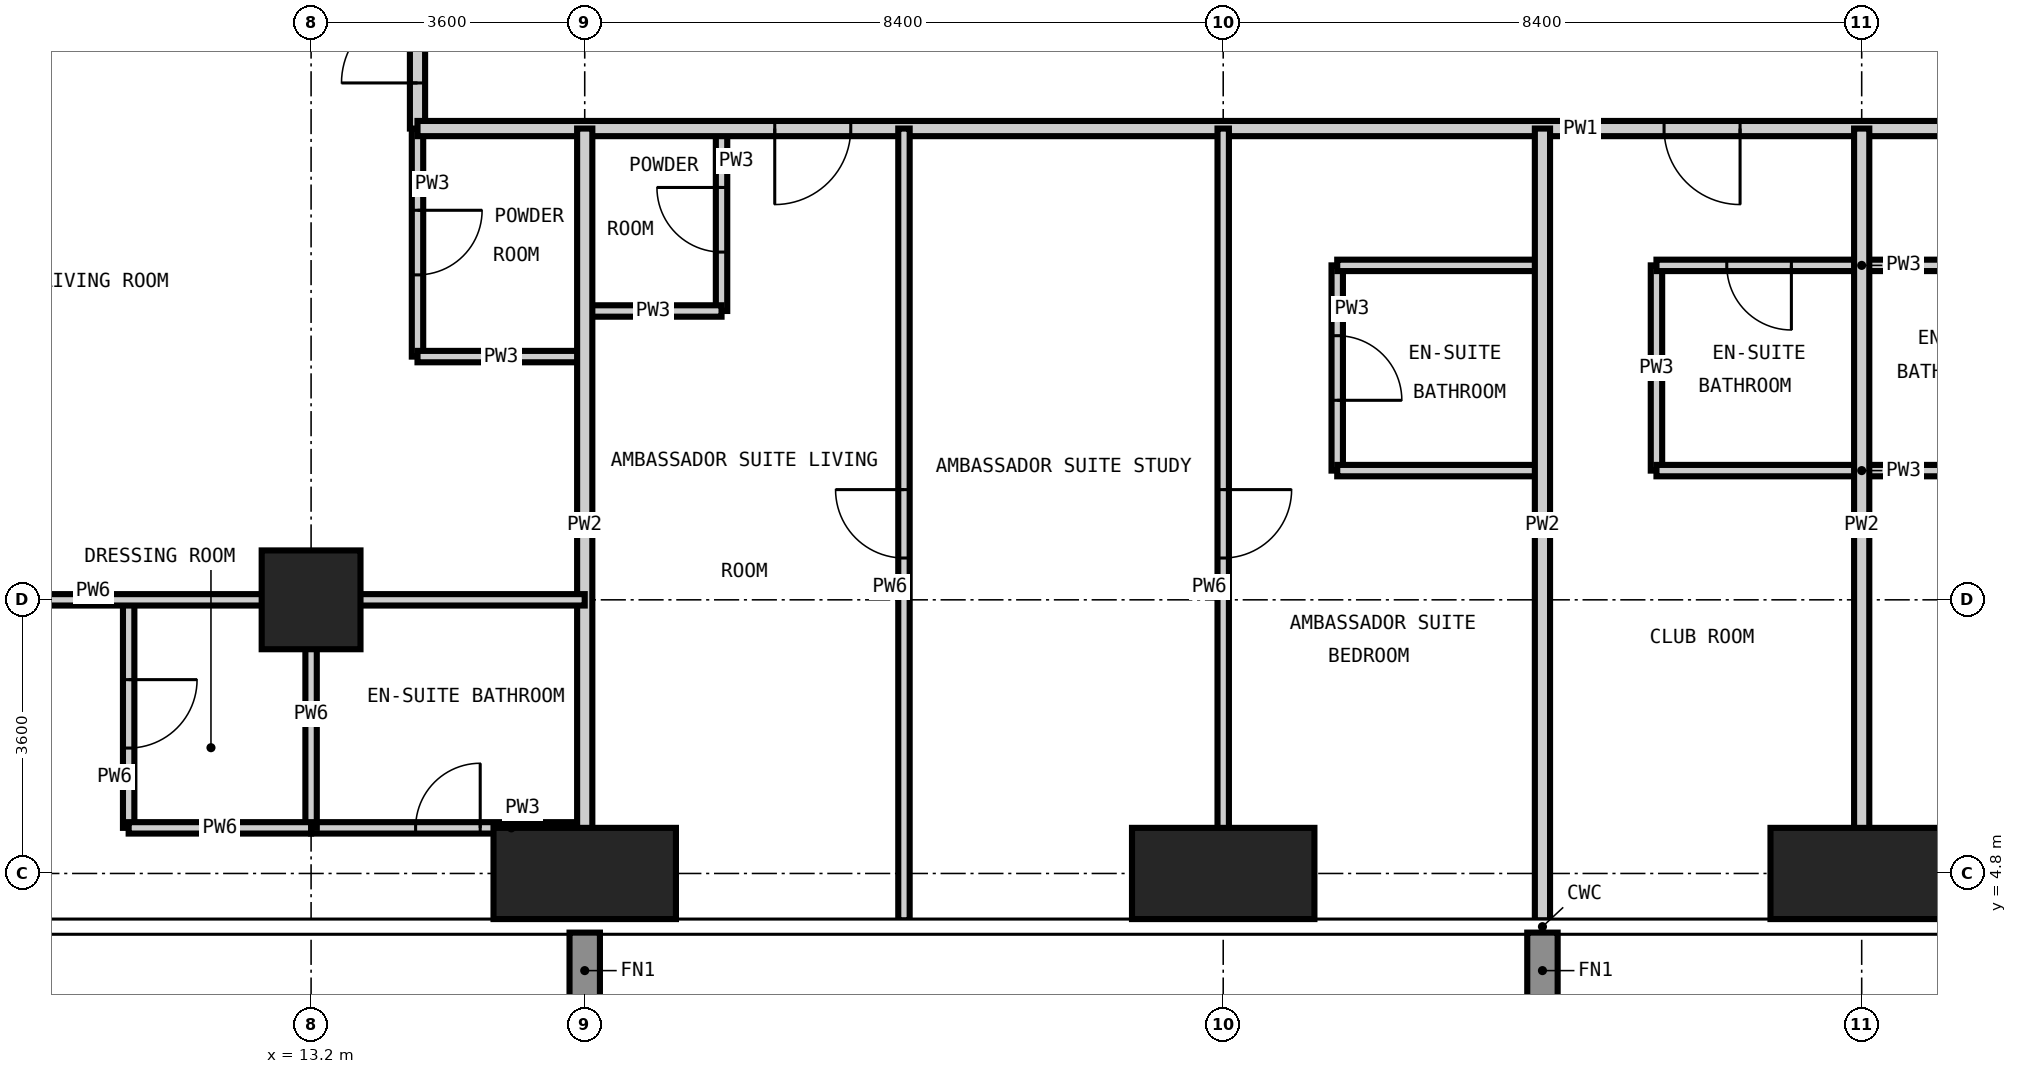
"""IFC4 building model, lengths in metres.
Left out: names, types, materials, properties, quantities, classifications, styles, units other than length and angle.
Written with IfcOpenShell. Run it as: python <this file> out.ifc"""

import sys

from ifc_helpers import new_model, si_unit, direction, frame, frame_2d, origin, origin_2d, place, context, subcontext, project, spatial, rectangle, extrude, element, fill, save


model = new_model("IFC4")
c1 = context("Model", 3, precision=1e-05, world=origin(), true_north=direction((0.0, 1.0)))
c2 = subcontext(c1, "Body", "Model", "MODEL_VIEW")
j1 = project(units=[si_unit("LENGTHUNIT", "METRE"), si_unit("PLANEANGLEUNIT", "RADIAN")], contexts=[c1])
p1 = place(None, origin())
s1 = spatial("IfcSite", under=j1, at=p1, CompositionType="ELEMENT")
p2 = place(p1, origin())
s2 = spatial("IfcBuilding", under=s1, at=p2, CompositionType="ELEMENT")
p3 = place(p2, frame((0.0, 0.0, 205.8)))
s3 = spatial("IfcBuildingStorey", under=s2, at=p3, CompositionType="ELEMENT", Elevation=205.8)
p4 = place(p3, frame((13.2, 8.4, -0.35), z_axis=(0.0, 0.0, 1.0), x_axis=(1.0, 0.0, 0.0)))
e1 = element("IfcColumn", 1, at=p4, inside=s3, PredefinedType="COLUMN", context=c2, shape_type="SweptSolid", body=[
    extrude(rectangle(XDim=1.3, YDim=1.3, at=origin_2d()), origin(), (0.0, 0.0, 1.0), 3.6),
])
for number, where, z_axis, x_axis in (
    (2, (16.8, 4.8, -0.35), (0.0, 0.0, 1.0), (1.0, 0.0, 0.0)),
    (3, (25.2, 4.8, -0.35), (0.0, 0.0, 1.0), (1.0, 0.0, 0.0)),
    (4, (33.6, 4.8, -0.35), (0.0, 0.0, 1.0), (1.0, 0.0, 0.0)),
):
    element("IfcColumn", number, at=place(p3, frame(where, z_axis=z_axis, x_axis=x_axis)), inside=s3, PredefinedType="COLUMN", context=c2, shape_type="SweptSolid", body=[
        extrude(rectangle(XDim=2.4, YDim=1.2, at=origin_2d()), origin(), (0.0, 0.0, 1.0), 3.6),
    ])
p5 = place(p3, frame((14.6, 11.6, 0.0), z_axis=(0.0, 0.0, 1.0), x_axis=(0.0, 1.0, 0.0)))
e5 = element("IfcWall", 5, at=p5, inside=s3, PredefinedType="PARTITIONING", context=c2, shape_type="SweptSolid", body=[
    extrude(rectangle(XDim=3.0, YDim=0.15, at=frame_2d((1.5, 0.0))), origin(), (0.0, 0.0, 1.0), 3.25),
])
p6 = place(p5, frame((1.075, 0.0, 0.0)))
e6 = element("IfcOpeningElement", 6, at=p6, cuts=e5, PredefinedType="OPENING", context=c2, shape_type="SweptSolid", body=[
    extrude(rectangle(XDim=0.85, YDim=2.1, at=frame_2d((0.425, 1.05))), frame((0.0, 0.085, 0.0), z_axis=(0.0, -1.0, 0.0), x_axis=(1.0, 0.0, 0.0)), (0.0, 0.0, 1.0), 0.17),
])
p7 = place(p3, frame((18.6, 12.2, 0.0), z_axis=(0.0, 0.0, 1.0), x_axis=(0.0, 1.0, 0.0)))
e7 = element("IfcWall", 7, at=p7, inside=s3, PredefinedType="PARTITIONING", context=c2, shape_type="SweptSolid", body=[
    extrude(rectangle(XDim=2.4, YDim=0.15, at=frame_2d((1.2, 0.0))), origin(), (0.0, 0.0, 1.0), 3.25),
])
p8 = place(p7, frame((0.775, 0.0, 0.0)))
e8 = element("IfcOpeningElement", 8, at=p8, cuts=e7, PredefinedType="OPENING", context=c2, shape_type="SweptSolid", body=[
    extrude(rectangle(XDim=0.85, YDim=2.1, at=frame_2d((0.425, 1.05))), frame((0.0, 0.085, 0.0), z_axis=(0.0, -1.0, 0.0), x_axis=(1.0, 0.0, 0.0)), (0.0, 0.0, 1.0), 0.17),
])
p9 = place(p3, frame((26.7, 10.1, 0.0), z_axis=(0.0, 0.0, 1.0), x_axis=(0.0, 1.0, 0.0)))
e9 = element("IfcWall", 9, at=p9, inside=s3, PredefinedType="PARTITIONING", context=c2, shape_type="SweptSolid", body=[
    extrude(rectangle(XDim=2.7, YDim=0.15, at=frame_2d((1.35, 0.0))), origin(), (0.0, 0.0, 1.0), 3.25),
])
p10 = place(p9, frame((0.925, 0.0, 0.0)))
e10 = element("IfcOpeningElement", 10, at=p10, cuts=e9, PredefinedType="OPENING", context=c2, shape_type="SweptSolid", body=[
    extrude(rectangle(XDim=0.85, YDim=2.1, at=frame_2d((0.425, 1.05))), frame((0.0, 0.085, 0.0), z_axis=(0.0, -1.0, 0.0), x_axis=(1.0, 0.0, 0.0)), (0.0, 0.0, 1.0), 0.17),
])
p11 = place(p3, frame((30.9, 10.1, 0.0), z_axis=(0.0, 0.0, 1.0), x_axis=(0.0, 1.0, 0.0)))
e11 = element("IfcWall", 11, at=p11, inside=s3, PredefinedType="PARTITIONING", context=c2, shape_type="SweptSolid", body=[
    extrude(rectangle(XDim=2.7, YDim=0.15, at=frame_2d((1.35, 0.0))), origin(), (0.0, 0.0, 1.0), 3.25),
])
p12 = place(p3, frame((13.2, 5.4, 0.0), z_axis=(0.0, 0.0, 1.0), x_axis=(1.0, 0.0, 0.0)))
e12 = element("IfcWall", 12, at=p12, inside=s3, PredefinedType="PARTITIONING", context=c2, shape_type="SweptSolid", body=[
    extrude(rectangle(XDim=3.6, YDim=0.15, at=frame_2d((1.8, 0.0))), origin(), (0.0, 0.0, 1.0), 3.25),
])
p13 = place(p12, frame((1.375, 0.0, 0.0)))
e13 = element("IfcOpeningElement", 13, at=p13, cuts=e12, PredefinedType="OPENING", context=c2, shape_type="SweptSolid", body=[
    extrude(rectangle(XDim=0.85, YDim=2.1, at=frame_2d((0.425, 1.05))), frame((0.0, 0.085, 0.0), z_axis=(0.0, -1.0, 0.0), x_axis=(1.0, 0.0, 0.0)), (0.0, 0.0, 1.0), 0.17),
])
p14 = place(p3, frame((26.7, 10.1, 0.0), z_axis=(0.0, 0.0, 1.0), x_axis=(1.0, 0.0, 0.0)))
e14 = element("IfcWall", 14, at=p14, inside=s3, PredefinedType="PARTITIONING", context=c2, shape_type="SweptSolid", body=[
    extrude(rectangle(XDim=2.7, YDim=0.15, at=frame_2d((1.35, 0.0))), origin(), (0.0, 0.0, 1.0), 3.25),
])
p15 = place(p3, frame((30.9, 10.1, 0.0), z_axis=(0.0, 0.0, 1.0), x_axis=(1.0, 0.0, 0.0)))
e15 = element("IfcWall", 15, at=p15, inside=s3, PredefinedType="PARTITIONING", context=c2, shape_type="SweptSolid", body=[
    extrude(rectangle(XDim=5.4, YDim=0.15, at=frame_2d((2.7, 0.0))), origin(), (0.0, 0.0, 1.0), 3.25),
])
p16 = place(p3, frame((14.6, 11.6, 0.0), z_axis=(0.0, 0.0, 1.0), x_axis=(1.0, 0.0, 0.0)))
e16 = element("IfcWall", 16, at=p16, inside=s3, PredefinedType="PARTITIONING", context=c2, shape_type="SweptSolid", body=[
    extrude(rectangle(XDim=2.2, YDim=0.15, at=frame_2d((1.1, 0.0))), origin(), (0.0, 0.0, 1.0), 3.25),
])
p17 = place(p3, frame((16.8, 12.2, 0.0), z_axis=(0.0, 0.0, 1.0), x_axis=(1.0, 0.0, 0.0)))
e17 = element("IfcWall", 17, at=p17, inside=s3, PredefinedType="PARTITIONING", context=c2, shape_type="SweptSolid", body=[
    extrude(rectangle(XDim=1.8, YDim=0.15, at=frame_2d((0.9, 0.0))), origin(), (0.0, 0.0, 1.0), 3.25),
])
p18 = place(p3, frame((26.7, 12.8, 0.0), z_axis=(0.0, 0.0, 1.0), x_axis=(1.0, 0.0, 0.0)))
e18 = element("IfcWall", 18, at=p18, inside=s3, PredefinedType="PARTITIONING", context=c2, shape_type="SweptSolid", body=[
    extrude(rectangle(XDim=2.7, YDim=0.15, at=frame_2d((1.35, 0.0))), origin(), (0.0, 0.0, 1.0), 3.25),
])
p19 = place(p3, frame((30.9, 12.8, 0.0), z_axis=(0.0, 0.0, 1.0), x_axis=(1.0, 0.0, 0.0)))
e19 = element("IfcWall", 19, at=p19, inside=s3, PredefinedType="PARTITIONING", context=c2, shape_type="SweptSolid", body=[
    extrude(rectangle(XDim=5.4, YDim=0.15, at=frame_2d((2.7, 0.0))), origin(), (0.0, 0.0, 1.0), 3.25),
])
p20 = place(p19, frame((0.925, 0.0, 0.0)))
e20 = element("IfcOpeningElement", 20, at=p20, cuts=e19, PredefinedType="OPENING", context=c2, shape_type="SweptSolid", body=[
    extrude(rectangle(XDim=0.85, YDim=2.1, at=frame_2d((0.425, 1.05))), frame((0.0, 0.085, 0.0), z_axis=(0.0, -1.0, 0.0), x_axis=(1.0, 0.0, 0.0)), (0.0, 0.0, 1.0), 0.17),
])
p21 = place(p3, frame((14.6, 14.6, 0.0), z_axis=(0.0, 0.0, 1.0), x_axis=(0.0, 1.0, 0.0)))
e21 = element("IfcWall", 21, at=p21, inside=s3, PredefinedType="PARTITIONING", context=c2, shape_type="SweptSolid", body=[
    extrude(rectangle(XDim=13.0, YDim=0.2, at=frame_2d((6.5, 0.0))), origin(), (0.0, 0.0, 1.0), 3.25),
])
p22 = place(p21, frame((3.8, 0.0, 0.0)))
e22 = element("IfcOpeningElement", 22, at=p22, cuts=e21, PredefinedType="OPENING", context=c2, shape_type="SweptSolid", body=[
    extrude(rectangle(XDim=1.0, YDim=2.2, at=frame_2d((0.5, 1.1))), frame((0.0, 0.11, 0.0), z_axis=(0.0, -1.0, 0.0), x_axis=(1.0, 0.0, 0.0)), (0.0, 0.0, 1.0), 0.22),
])
p23 = place(p21, frame((8.0, 0.0, 0.0)))
e23 = element("IfcOpeningElement", 23, at=p23, cuts=e21, PredefinedType="OPENING", context=c2, shape_type="SweptSolid", body=[
    extrude(rectangle(XDim=1.0, YDim=2.2, at=frame_2d((0.5, 1.1))), frame((0.0, 0.11, 0.0), z_axis=(0.0, -1.0, 0.0), x_axis=(1.0, 0.0, 0.0)), (0.0, 0.0, 1.0), 0.22),
])
p24 = place(p21, frame((0.6, 0.0, 0.0)))
e24 = element("IfcOpeningElement", 24, at=p24, cuts=e21, PredefinedType="OPENING", context=c2, shape_type="SweptSolid", body=[
    extrude(rectangle(XDim=1.0, YDim=2.2, at=frame_2d((0.5, 1.1))), frame((0.0, 0.11, 0.0), z_axis=(0.0, -1.0, 0.0), x_axis=(1.0, 0.0, 0.0)), (0.0, 0.0, 1.0), 0.22),
])
p25 = place(p3, frame((44.8, 14.6, 0.0), z_axis=(0.0, 0.0, 1.0), x_axis=(-1.0, 0.0, 0.0)))
e25 = element("IfcWall", 25, at=p25, inside=s3, PredefinedType="PARTITIONING", context=c2, shape_type="SweptSolid", body=[
    extrude(rectangle(XDim=30.2, YDim=0.2, at=frame_2d((15.1, 0.0))), origin(), (0.0, 0.0, 1.0), 3.25),
])
p26 = place(p25, frame((24.5, 0.0, 0.0)))
e26 = element("IfcOpeningElement", 26, at=p26, cuts=e25, PredefinedType="OPENING", context=c2, shape_type="SweptSolid", body=[
    extrude(rectangle(XDim=1.0, YDim=2.2, at=frame_2d((0.5, 1.1))), frame((0.0, 0.11, 0.0), z_axis=(0.0, -1.0, 0.0), x_axis=(1.0, 0.0, 0.0)), (0.0, 0.0, 1.0), 0.22),
])
p27 = place(p25, frame((12.8, 0.0, 0.0)))
e27 = element("IfcOpeningElement", 27, at=p27, cuts=e25, PredefinedType="OPENING", context=c2, shape_type="SweptSolid", body=[
    extrude(rectangle(XDim=1.0, YDim=2.2, at=frame_2d((0.5, 1.1))), frame((0.0, 0.11, 0.0), z_axis=(0.0, -1.0, 0.0), x_axis=(1.0, 0.0, 0.0)), (0.0, 0.0, 1.0), 0.22),
])
p28 = place(p25, frame((6.5, 0.0, 0.0)))
e28 = element("IfcOpeningElement", 28, at=p28, cuts=e25, PredefinedType="OPENING", context=c2, shape_type="SweptSolid", body=[
    extrude(rectangle(XDim=1.0, YDim=2.2, at=frame_2d((0.5, 1.1))), frame((0.0, 0.11, 0.0), z_axis=(0.0, -1.0, 0.0), x_axis=(1.0, 0.0, 0.0)), (0.0, 0.0, 1.0), 0.22),
])
for number, where, z_axis, x_axis in (
    (29, (16.8, 4.182, 0.0), (0.0, 0.0, 1.0), (0.0, 1.0, 0.0)),
    (30, (29.4, 4.182, 0.0), (0.0, 0.0, 1.0), (0.0, 1.0, 0.0)),
    (31, (33.6, 4.182, 0.0), (0.0, 0.0, 1.0), (0.0, 1.0, 0.0)),
):
    element("IfcWall", number, at=place(p3, frame(where, z_axis=z_axis, x_axis=x_axis)), inside=s3, PredefinedType="PARTITIONING", context=c2, shape_type="SweptSolid", body=[
        extrude(rectangle(XDim=10.418, YDim=0.2, at=frame_2d((5.209, 0.0))), origin(), (0.0, 0.0, 1.0), 3.25),
    ])
p29 = place(p3, frame((10.8, 5.4, 0.0), z_axis=(0.0, 0.0, 1.0), x_axis=(0.0, 1.0, 0.0)))
e32 = element("IfcWall", 32, at=p29, inside=s3, PredefinedType="PARTITIONING", context=c2, shape_type="SweptSolid", body=[
    extrude(rectangle(XDim=3.0, YDim=0.15, at=frame_2d((1.5, 0.0))), origin(), (0.0, 0.0, 1.0), 3.25),
])
p30 = place(p29, frame((1.05, 0.0, 0.0)))
e33 = element("IfcOpeningElement", 33, at=p30, cuts=e32, PredefinedType="OPENING", context=c2, shape_type="SweptSolid", body=[
    extrude(rectangle(XDim=0.9, YDim=2.1, at=frame_2d((0.45, 1.05))), frame((0.0, 0.085, 0.0), z_axis=(0.0, -1.0, 0.0), x_axis=(1.0, 0.0, 0.0)), (0.0, 0.0, 1.0), 0.17),
])
p31 = place(p3, frame((13.2, 5.4, 0.0), z_axis=(0.0, 0.0, 1.0), x_axis=(0.0, 1.0, 0.0)))
e34 = element("IfcWall", 34, at=p31, inside=s3, PredefinedType="PARTITIONING", context=c2, shape_type="SweptSolid", body=[
    extrude(rectangle(XDim=3.0, YDim=0.15, at=frame_2d((1.5, 0.0))), origin(), (0.0, 0.0, 1.0), 3.25),
])
p32 = place(p3, frame((21.0, 4.182, 0.0), z_axis=(0.0, 0.0, 1.0), x_axis=(0.0, 1.0, 0.0)))
e35 = element("IfcWall", 35, at=p32, inside=s3, PredefinedType="PARTITIONING", context=c2, shape_type="SweptSolid", body=[
    extrude(rectangle(XDim=10.418, YDim=0.15, at=frame_2d((5.209, 0.0))), origin(), (0.0, 0.0, 1.0), 3.25),
])
p33 = place(p32, frame((4.768, 0.0, 0.0)))
e36 = element("IfcOpeningElement", 36, at=p33, cuts=e35, PredefinedType="OPENING", context=c2, shape_type="SweptSolid", body=[
    extrude(rectangle(XDim=0.9, YDim=2.1, at=frame_2d((0.45, 1.05))), frame((0.0, 0.085, 0.0), z_axis=(0.0, -1.0, 0.0), x_axis=(1.0, 0.0, 0.0)), (0.0, 0.0, 1.0), 0.17),
])
p34 = place(p3, frame((25.2, 4.182, 0.0), z_axis=(0.0, 0.0, 1.0), x_axis=(0.0, 1.0, 0.0)))
e37 = element("IfcWall", 37, at=p34, inside=s3, PredefinedType="PARTITIONING", context=c2, shape_type="SweptSolid", body=[
    extrude(rectangle(XDim=10.418, YDim=0.15, at=frame_2d((5.209, 0.0))), origin(), (0.0, 0.0, 1.0), 3.25),
])
p35 = place(p34, frame((4.768, 0.0, 0.0)))
e38 = element("IfcOpeningElement", 38, at=p35, cuts=e37, PredefinedType="OPENING", context=c2, shape_type="SweptSolid", body=[
    extrude(rectangle(XDim=0.9, YDim=2.1, at=frame_2d((0.45, 1.05))), frame((0.0, 0.085, 0.0), z_axis=(0.0, -1.0, 0.0), x_axis=(1.0, 0.0, 0.0)), (0.0, 0.0, 1.0), 0.17),
])
p36 = place(p3, frame((10.8, 5.4, 0.0), z_axis=(0.0, 0.0, 1.0), x_axis=(1.0, 0.0, 0.0)))
e39 = element("IfcWall", 39, at=p36, inside=s3, PredefinedType="PARTITIONING", context=c2, shape_type="SweptSolid", body=[
    extrude(rectangle(XDim=2.4, YDim=0.15, at=frame_2d((1.2, 0.0))), origin(), (0.0, 0.0, 1.0), 3.25),
])
p37 = place(p3, frame((4.182, 8.4, 0.0), z_axis=(0.0, 0.0, 1.0), x_axis=(1.0, 0.0, 0.0)))
e40 = element("IfcWall", 40, at=p37, inside=s3, PredefinedType="PARTITIONING", context=c2, shape_type="SweptSolid", body=[
    extrude(rectangle(XDim=12.618, YDim=0.15, at=frame_2d((6.309, 0.0))), origin(), (0.0, 0.0, 1.0), 3.25),
])
p38 = place(p37, frame((2.868, 0.0, 0.0)))
e41 = element("IfcOpeningElement", 41, at=p38, cuts=e40, PredefinedType="OPENING", context=c2, shape_type="SweptSolid", body=[
    extrude(rectangle(XDim=0.9, YDim=2.1, at=frame_2d((0.45, 1.05))), frame((0.0, 0.085, 0.0), z_axis=(0.0, -1.0, 0.0), x_axis=(1.0, 0.0, 0.0)), (0.0, 0.0, 1.0), 0.17),
])
p39 = place(p26, origin())
e42 = element("IfcDoor", 42, at=p39, inside=s3, OperationType="SINGLE_SWING_RIGHT", PredefinedType="DOOR", context=c2, shape_type="SweptSolid", body=[
    extrude(rectangle(XDim=1.0, YDim=2.2, at=frame_2d((0.5, 1.1))), frame((0.0, 0.025, 0.0), z_axis=(0.0, -1.0, 0.0), x_axis=(1.0, 0.0, 0.0)), (0.0, 0.0, 1.0), 0.05),
])
fill(e26, e42)
p40 = place(p8, origin())
e43 = element("IfcDoor", 43, at=p40, inside=s3, OperationType="SINGLE_SWING_RIGHT", PredefinedType="DOOR", context=c2, shape_type="SweptSolid", body=[
    extrude(rectangle(XDim=0.85, YDim=2.1, at=frame_2d((0.425, 1.05))), frame((0.0, 0.025, 0.0), z_axis=(0.0, -1.0, 0.0), x_axis=(1.0, 0.0, 0.0)), (0.0, 0.0, 1.0), 0.05),
])
fill(e8, e43)
p41 = place(p33, origin())
e44 = element("IfcDoor", 44, at=p41, inside=s3, OperationType="SINGLE_SWING_RIGHT", PredefinedType="DOOR", context=c2, shape_type="SweptSolid", body=[
    extrude(rectangle(XDim=0.9, YDim=2.1, at=frame_2d((0.45, 1.05))), frame((0.0, 0.025, 0.0), z_axis=(0.0, -1.0, 0.0), x_axis=(1.0, 0.0, 0.0)), (0.0, 0.0, 1.0), 0.05),
])
fill(e36, e44)
p42 = place(p35, frame((0.9, 0.0, 0.0), z_axis=(0.0, 0.0, 1.0), x_axis=(-1.0, 0.0, 0.0)))
e45 = element("IfcDoor", 45, at=p42, inside=s3, OperationType="SINGLE_SWING_LEFT", PredefinedType="DOOR", context=c2, shape_type="SweptSolid", body=[
    extrude(rectangle(XDim=0.9, YDim=2.1, at=frame_2d((0.45, 1.05))), frame((0.0, 0.025, 0.0), z_axis=(0.0, -1.0, 0.0), x_axis=(1.0, 0.0, 0.0)), (0.0, 0.0, 1.0), 0.05),
])
fill(e38, e45)
p43 = place(p10, frame((0.85, 0.0, 0.0), z_axis=(0.0, 0.0, 1.0), x_axis=(-1.0, 0.0, 0.0)))
e46 = element("IfcDoor", 46, at=p43, inside=s3, OperationType="SINGLE_SWING_RIGHT", PredefinedType="DOOR", context=c2, shape_type="SweptSolid", body=[
    extrude(rectangle(XDim=0.85, YDim=2.1, at=frame_2d((0.425, 1.05))), frame((0.0, 0.025, 0.0), z_axis=(0.0, -1.0, 0.0), x_axis=(1.0, 0.0, 0.0)), (0.0, 0.0, 1.0), 0.05),
])
fill(e10, e46)
p44 = place(p27, origin())
e47 = element("IfcDoor", 47, at=p44, inside=s3, OperationType="SINGLE_SWING_LEFT", PredefinedType="DOOR", context=c2, shape_type="SweptSolid", body=[
    extrude(rectangle(XDim=1.0, YDim=2.2, at=frame_2d((0.5, 1.1))), frame((0.0, 0.025, 0.0), z_axis=(0.0, -1.0, 0.0), x_axis=(1.0, 0.0, 0.0)), (0.0, 0.0, 1.0), 0.05),
])
fill(e27, e47)
p45 = place(p20, frame((0.85, 0.0, 0.0), z_axis=(0.0, 0.0, 1.0), x_axis=(-1.0, 0.0, 0.0)))
e48 = element("IfcDoor", 48, at=p45, inside=s3, OperationType="SINGLE_SWING_LEFT", PredefinedType="DOOR", context=c2, shape_type="SweptSolid", body=[
    extrude(rectangle(XDim=0.85, YDim=2.1, at=frame_2d((0.425, 1.05))), frame((0.0, 0.025, 0.0), z_axis=(0.0, -1.0, 0.0), x_axis=(1.0, 0.0, 0.0)), (0.0, 0.0, 1.0), 0.05),
])
fill(e20, e48)
p46 = place(p24, origin())
e49 = element("IfcDoor", 49, at=p46, inside=s3, OperationType="SINGLE_SWING_LEFT", PredefinedType="DOOR", context=c2, shape_type="SweptSolid", body=[
    extrude(rectangle(XDim=1.0, YDim=2.2, at=frame_2d((0.5, 1.1))), frame((0.0, 0.025, 0.0), z_axis=(0.0, -1.0, 0.0), x_axis=(1.0, 0.0, 0.0)), (0.0, 0.0, 1.0), 0.05),
])
fill(e24, e49)
p47 = place(p6, frame((0.85, 0.0, 0.0), z_axis=(0.0, 0.0, 1.0), x_axis=(-1.0, 0.0, 0.0)))
e50 = element("IfcDoor", 50, at=p47, inside=s3, OperationType="SINGLE_SWING_LEFT", PredefinedType="DOOR", context=c2, shape_type="SweptSolid", body=[
    extrude(rectangle(XDim=0.85, YDim=2.1, at=frame_2d((0.425, 1.05))), frame((0.0, 0.025, 0.0), z_axis=(0.0, -1.0, 0.0), x_axis=(1.0, 0.0, 0.0)), (0.0, 0.0, 1.0), 0.05),
])
fill(e6, e50)
p48 = place(p13, origin())
e51 = element("IfcDoor", 51, at=p48, inside=s3, OperationType="SINGLE_SWING_RIGHT", PredefinedType="DOOR", context=c2, shape_type="SweptSolid", body=[
    extrude(rectangle(XDim=0.85, YDim=2.1, at=frame_2d((0.425, 1.05))), frame((0.0, 0.025, 0.0), z_axis=(0.0, -1.0, 0.0), x_axis=(1.0, 0.0, 0.0)), (0.0, 0.0, 1.0), 0.05),
])
fill(e13, e51)
p49 = place(p30, frame((0.9, 0.0, 0.0), z_axis=(0.0, 0.0, 1.0), x_axis=(-1.0, 0.0, 0.0)))
e52 = element("IfcDoor", 52, at=p49, inside=s3, OperationType="SINGLE_SWING_LEFT", PredefinedType="DOOR", context=c2, shape_type="SweptSolid", body=[
    extrude(rectangle(XDim=0.9, YDim=2.1, at=frame_2d((0.45, 1.05))), frame((0.0, 0.025, 0.0), z_axis=(0.0, -1.0, 0.0), x_axis=(1.0, 0.0, 0.0)), (0.0, 0.0, 1.0), 0.05),
])
fill(e33, e52)
save(model, sys.argv[1])
